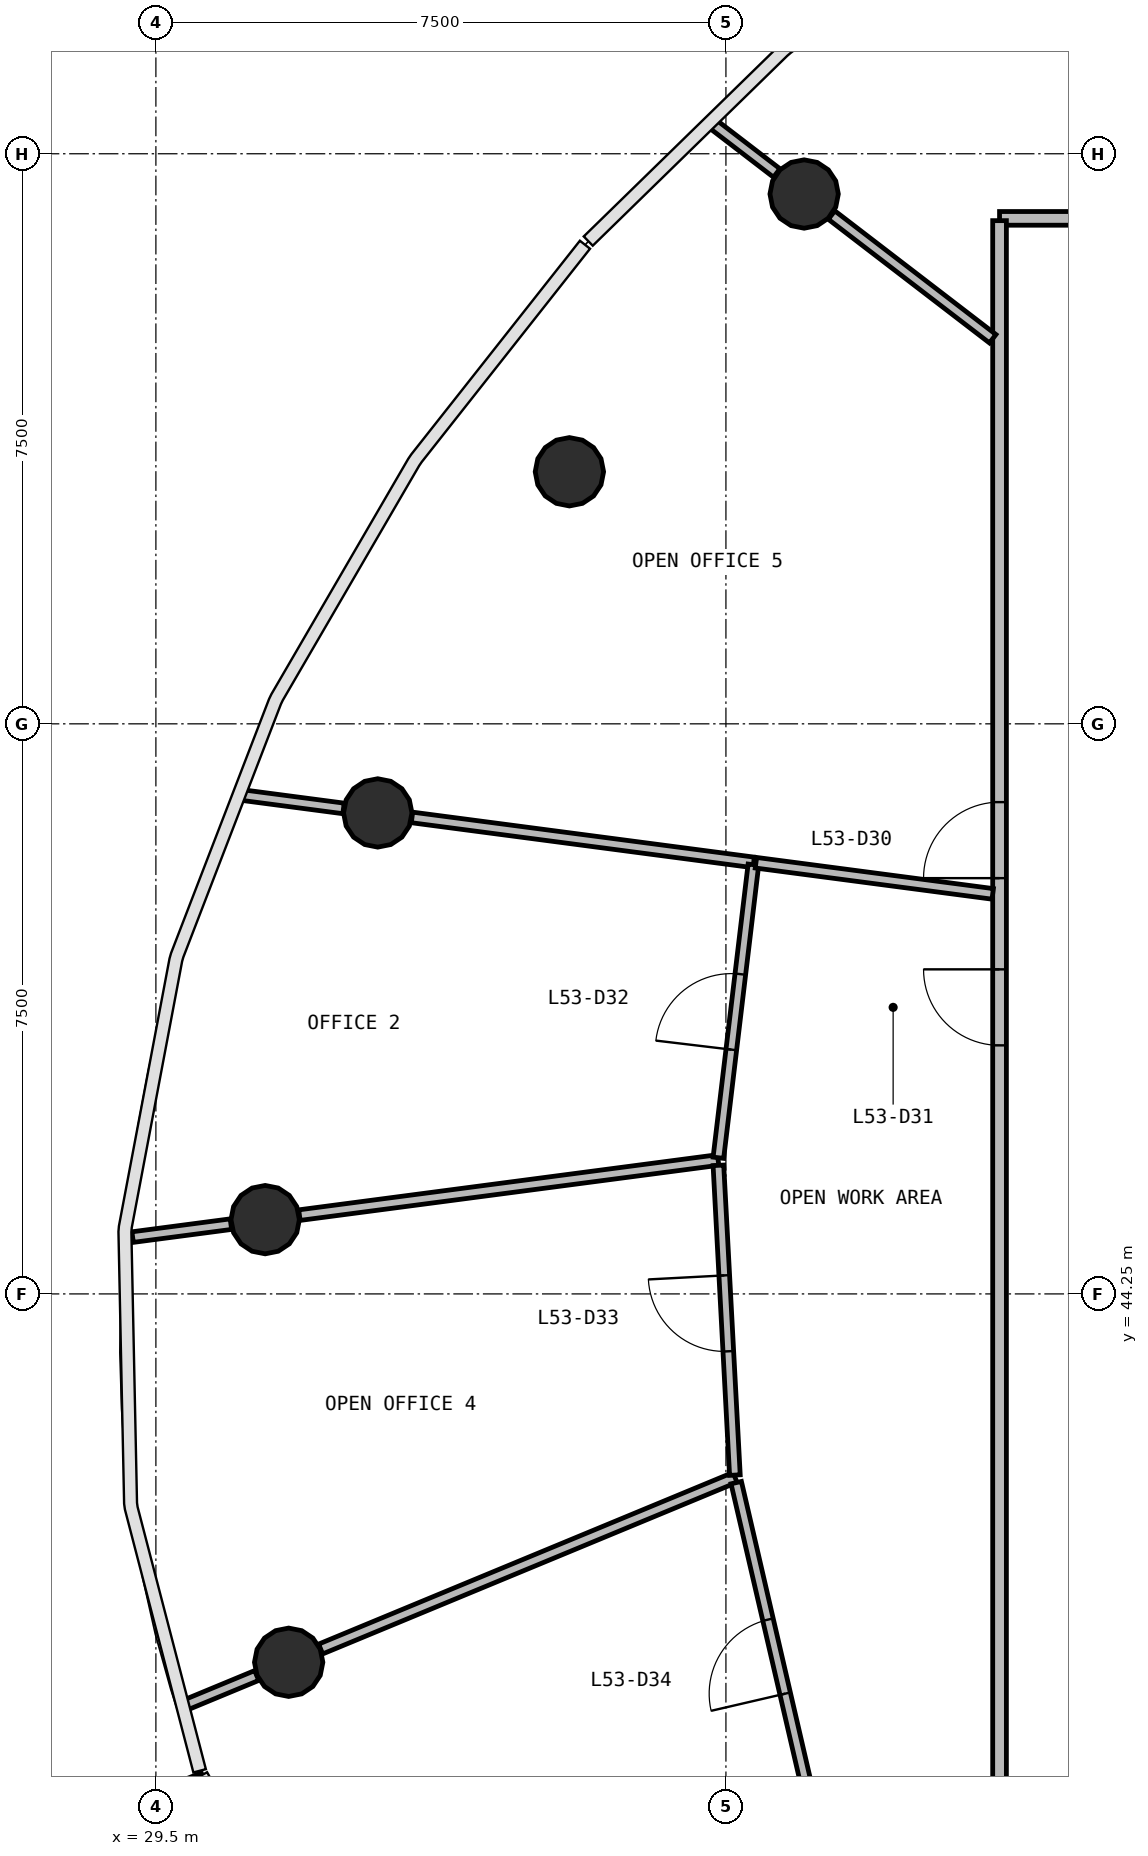
"""IFC4 building model, lengths in metres.
Left out: names, types, materials, properties, quantities, classifications, styles, units other than length and angle.
Written with IfcOpenShell. Run it as: python <this file> out.ifc"""

import sys

from ifc_helpers import new_model, si_unit, direction, frame, frame_2d, origin, origin_2d, place, context, subcontext, project, spatial, rectangle, circle, extrude, source, transform, mapped, element, fill, save


model = new_model("IFC4")
c1 = context("Model", 3, precision=1e-05, world=origin(), true_north=direction((0.0, 1.0)))
c2 = subcontext(c1, "Body", "Model", "MODEL_VIEW")
j1 = project(units=[si_unit("LENGTHUNIT", "METRE"), si_unit("PLANEANGLEUNIT", "RADIAN")], contexts=[c1])
p1 = place(None, origin())
s1 = spatial("IfcSite", under=j1, at=p1, CompositionType="ELEMENT")
p2 = place(p1, origin())
s2 = spatial("IfcBuilding", under=s1, at=p2, CompositionType="ELEMENT")
p3 = place(p2, frame((0.0, 0.0, 218.9)))
s3 = spatial("IfcBuildingStorey", under=s2, at=p3, CompositionType="ELEMENT", Elevation=218.9)
m1 = source(origin(), c2, "Body", "SweptSolid", [
    extrude(circle(Radius=0.45, at=origin_2d()), origin(), (0.0, 0.0, 1.0), 3.9),
])
for number, where, z_axis, x_axis in (
    (1, (38.029, 58.72, 0.0), (0.0, 0.0, 1.0), (1.0, 0.0, 0.0)),
    (2, (34.941, 55.066, 0.0), (0.0, 0.0, 1.0), (1.0, 0.0, 0.0)),
    (3, (32.419, 50.578, 0.0), (0.0, 0.0, 1.0), (1.0, 0.0, 0.0)),
    (4, (30.938, 45.227, 0.0), (0.0, 0.0, 1.0), (1.0, 0.0, 0.0)),
    (5, (31.247, 39.404, 0.0), (0.0, 0.0, 1.0), (1.0, 0.0, 0.0)),
):
    element("IfcColumn", number, at=place(p3, frame(where, z_axis=z_axis, x_axis=x_axis)), inside=s3, PredefinedType="COLUMN", context=c2, shape_type="MappedRepresentation", body=[
        mapped(m1, transform((0.0, 0.0, 0.0), scale=1.0)),
    ])
p4 = place(p3, frame((40.6, 58.4, 0.0), z_axis=(0.0, 0.0, 1.0), x_axis=(1.0, 0.0, 0.0)))
e6 = element("IfcWall", 6, at=p4, inside=s3, PredefinedType="PARTITIONING", context=c2, shape_type="SweptSolid", body=[
    extrude(rectangle(XDim=22.8, YDim=0.18, at=frame_2d((11.4, 0.0))), origin(), (0.0, 0.0, 1.0), 2.88),
])
p5 = place(p4, frame((10.95, 0.0, 0.0)))
e7 = element("IfcOpeningElement", 7, at=p5, cuts=e6, PredefinedType="OPENING", context=c2, shape_type="SweptSolid", body=[
    extrude(rectangle(XDim=1.0, YDim=2.1, at=frame_2d((0.5, 1.05))), frame((0.0, 0.1, 0.0), z_axis=(0.0, -1.0, 0.0), x_axis=(1.0, 0.0, 0.0)), (0.0, 0.0, 1.0), 0.2),
])
p6 = place(p4, frame((8.75, 0.0, 0.0)))
e8 = element("IfcOpeningElement", 8, at=p6, cuts=e6, PredefinedType="OPENING", context=c2, shape_type="SweptSolid", body=[
    extrude(rectangle(XDim=1.0, YDim=2.1, at=frame_2d((0.5, 1.05))), frame((0.0, 0.1, 0.0), z_axis=(0.0, -1.0, 0.0), x_axis=(1.0, 0.0, 0.0)), (0.0, 0.0, 1.0), 0.2),
])
p7 = place(p3, frame((40.6, 37.63, 0.0), z_axis=(0.0, 0.0, 1.0), x_axis=(0.0, 1.0, 0.0)))
e9 = element("IfcWall", 9, at=p7, inside=s3, PredefinedType="PARTITIONING", context=c2, shape_type="SweptSolid", body=[
    extrude(rectangle(XDim=20.74, YDim=0.18, at=frame_2d((10.37, 0.0))), origin(), (0.0, 0.0, 1.0), 2.88),
])
p8 = place(p7, frame((12.09, 0.0, 0.0)))
e10 = element("IfcOpeningElement", 10, at=p8, cuts=e9, PredefinedType="OPENING", context=c2, shape_type="SweptSolid", body=[
    extrude(rectangle(XDim=1.0, YDim=2.1, at=frame_2d((0.5, 1.05))), frame((0.0, 0.1, 0.0), z_axis=(0.0, -1.0, 0.0), x_axis=(1.0, 0.0, 0.0)), (0.0, 0.0, 1.0), 0.2),
])
p9 = place(p7, frame((9.89, 0.0, 0.0)))
e11 = element("IfcOpeningElement", 11, at=p9, cuts=e9, PredefinedType="OPENING", context=c2, shape_type="SweptSolid", body=[
    extrude(rectangle(XDim=1.0, YDim=2.1, at=frame_2d((0.5, 1.05))), frame((0.0, 0.1, 0.0), z_axis=(0.0, -1.0, 0.0), x_axis=(1.0, 0.0, 0.0)), (0.0, 0.0, 1.0), 0.2),
])
p10 = place(p3, frame((37.12, 41.836, 0.0), z_axis=(0.0, 0.0, 1.0), x_axis=(-0.923888768436, -0.382661134108, 0.0)))
e12 = element("IfcWall", 12, at=p10, inside=s3, PredefinedType="PARTITIONING", context=c2, shape_type="SweptSolid", body=[
    extrude(rectangle(XDim=5.902, YDim=0.14, at=frame_2d((2.951, 0.0))), origin(), (0.0, 0.0, 1.0), 2.88),
])
p11 = place(p3, frame((36.897, 46.012, 0.0), z_axis=(0.0, 0.0, 1.0), x_axis=(-0.991443375062, -0.130537481379, 0.0)))
e13 = element("IfcWall", 13, at=p11, inside=s3, PredefinedType="PARTITIONING", context=c2, shape_type="SweptSolid", body=[
    extrude(rectangle(XDim=5.557, YDim=0.14, at=frame_2d((2.778, 0.0))), origin(), (0.0, 0.0, 1.0), 2.88),
])
p12 = place(p3, frame((38.154, 37.375, 0.0), z_axis=(0.0, 0.0, 1.0), x_axis=(-0.225883778656, 0.974154258082, 0.0)))
e14 = element("IfcWall", 14, at=p12, inside=s3, PredefinedType="PARTITIONING", context=c2, shape_type="SweptSolid", body=[
    extrude(rectangle(XDim=4.508, YDim=0.14, at=frame_2d((2.254, 0.0))), origin(), (0.0, 0.0, 1.0), 2.88),
])
p13 = place(p12, frame((1.658, 0.0, 0.0)))
e15 = element("IfcOpeningElement", 15, at=p13, cuts=e14, PredefinedType="OPENING", context=c2, shape_type="SweptSolid", body=[
    extrude(rectangle(XDim=1.0, YDim=2.1, at=frame_2d((0.5, 1.05))), frame((0.0, 0.08, 0.0), z_axis=(0.0, -1.0, 0.0), x_axis=(1.0, 0.0, 0.0)), (0.0, 0.0, 1.0), 0.16),
])
p14 = place(p3, frame((37.365, 49.927, 0.0), z_axis=(0.0, 0.0, 1.0), x_axis=(-0.991445679667, 0.130519976512, 0.0)))
e16 = element("IfcWall", 16, at=p14, inside=s3, PredefinedType="PARTITIONING", context=c2, shape_type="SweptSolid", body=[
    extrude(rectangle(XDim=4.534, YDim=0.14, at=frame_2d((2.267, 0.0))), origin(), (0.0, 0.0, 1.0), 2.88),
])
p15 = place(p3, frame((37.118, 41.866, 0.0), z_axis=(0.0, 0.0, 1.0), x_axis=(-0.053180494254, 0.998584916285, 0.0)))
e17 = element("IfcWall", 17, at=p15, inside=s3, PredefinedType="PARTITIONING", context=c2, shape_type="SweptSolid", body=[
    extrude(rectangle(XDim=4.081, YDim=0.14, at=frame_2d((2.041, 0.0))), origin(), (0.0, 0.0, 1.0), 2.88),
])
p16 = place(p15, frame((1.631, 0.0, 0.0)))
e18 = element("IfcOpeningElement", 18, at=p16, cuts=e17, PredefinedType="OPENING", context=c2, shape_type="SweptSolid", body=[
    extrude(rectangle(XDim=1.0, YDim=2.1, at=frame_2d((0.5, 1.05))), frame((0.0, 0.08, 0.0), z_axis=(0.0, -1.0, 0.0), x_axis=(1.0, 0.0, 0.0)), (0.0, 0.0, 1.0), 0.16),
])
p17 = place(p3, frame((36.901, 46.042, 0.0), z_axis=(0.0, 0.0, 1.0), x_axis=(0.118646859406, 0.992936514966, 0.0)))
e19 = element("IfcWall", 19, at=p17, inside=s3, PredefinedType="PARTITIONING", context=c2, shape_type="SweptSolid", body=[
    extrude(rectangle(XDim=3.883, YDim=0.14, at=frame_2d((1.941, 0.0))), origin(), (0.0, 0.0, 1.0), 2.88),
])
p18 = place(p17, frame((1.433, 0.0, 0.0)))
e20 = element("IfcOpeningElement", 20, at=p18, cuts=e19, PredefinedType="OPENING", context=c2, shape_type="SweptSolid", body=[
    extrude(rectangle(XDim=1.0, YDim=2.1, at=frame_2d((0.5, 1.05))), frame((0.0, 0.08, 0.0), z_axis=(0.0, -1.0, 0.0), x_axis=(1.0, 0.0, 0.0)), (0.0, 0.0, 1.0), 0.16),
])
p19 = place(p3, frame((40.51, 49.513, 0.0), z_axis=(0.0, 0.0, 1.0), x_axis=(-0.991443713746, 0.13053490902, 0.0)))
e21 = element("IfcWall", 21, at=p19, inside=s3, PredefinedType="PARTITIONING", context=c2, shape_type="SweptSolid", body=[
    extrude(rectangle(XDim=3.142, YDim=0.14, at=frame_2d((1.571, 0.0))), origin(), (0.0, 0.0, 1.0), 2.88),
])
p20 = place(p3, frame((40.51, 56.817, 0.0), z_axis=(0.0, 0.0, 1.0), x_axis=(-0.793363703091, 0.608747923707, 0.0)))
e22 = element("IfcWall", 22, at=p20, inside=s3, PredefinedType="PARTITIONING", context=c2, shape_type="SweptSolid", body=[
    extrude(rectangle(XDim=2.673, YDim=0.14, at=frame_2d((1.336, 0.0))), origin(), (0.0, 0.0, 1.0), 2.88),
])
p21 = place(p3, frame((31.969, 50.637, 0.0), z_axis=(0.0, 0.0, 1.0), x_axis=(-0.991446880033, 0.130510858064, 0.0)))
e23 = element("IfcWall", 23, at=p21, inside=s3, PredefinedType="PARTITIONING", context=c2, shape_type="SweptSolid", body=[
    extrude(rectangle(XDim=1.345, YDim=0.14, at=frame_2d((0.672, 0.0))), origin(), (0.0, 0.0, 1.0), 2.88),
])
p22 = place(p3, frame((30.487, 45.168, 0.0), z_axis=(0.0, 0.0, 1.0), x_axis=(-0.991453658456, -0.130459354341, 0.0)))
e24 = element("IfcWall", 24, at=p22, inside=s3, PredefinedType="PARTITIONING", context=c2, shape_type="SweptSolid", body=[
    extrude(rectangle(XDim=1.304, YDim=0.14, at=frame_2d((0.652, 0.0))), origin(), (0.0, 0.0, 1.0), 2.88),
])
p23 = place(p3, frame((37.668, 58.997, 0.0), z_axis=(0.0, 0.0, 1.0), x_axis=(-0.793388088797, 0.608716141198, 0.0)))
e25 = element("IfcWall", 25, at=p23, inside=s3, PredefinedType="PARTITIONING", context=c2, shape_type="SweptSolid", body=[
    extrude(rectangle(XDim=1.044, YDim=0.14, at=frame_2d((0.522, 0.0))), origin(), (0.0, 0.0, 1.0), 2.88),
])
p24 = place(p3, frame((30.826, 39.23, 0.0), z_axis=(0.0, 0.0, 1.0), x_axis=(-0.92379344364, -0.382891203199, 0.0)))
e26 = element("IfcWall", 26, at=p24, inside=s3, PredefinedType="PARTITIONING", context=c2, shape_type="SweptSolid", body=[
    extrude(rectangle(XDim=1.026, YDim=0.14, at=frame_2d((0.513, 0.0))), origin(), (0.0, 0.0, 1.0), 2.88),
])
m2 = source(origin(), c2, "Body", "SweptSolid", [
    extrude(rectangle(XDim=1.0, YDim=2.1, at=frame_2d((0.5, 1.05))), frame((0.0, 0.025, 0.0), z_axis=(0.0, -1.0, 0.0), x_axis=(1.0, 0.0, 0.0)), (0.0, 0.0, 1.0), 0.05),
])
p25 = place(p8, origin())
e27 = element("IfcDoor", 27, at=p25, inside=s3, OperationType="SINGLE_SWING_LEFT", PredefinedType="DOOR", context=c2, shape_type="MappedRepresentation", body=[
    mapped(m2, transform((0.0, 0.0, 0.0), scale=1.0)),
])
fill(e10, e27)
p26 = place(p9, origin())
e28 = element("IfcDoor", 28, at=p26, inside=s3, OperationType="SINGLE_SWING_RIGHT", PredefinedType="DOOR", context=c2, shape_type="MappedRepresentation", body=[
    mapped(m2, transform((0.0, 0.0, 0.0), scale=1.0)),
])
fill(e11, e28)
p27 = place(p18, origin())
e29 = element("IfcDoor", 29, at=p27, inside=s3, OperationType="SINGLE_SWING_LEFT", PredefinedType="DOOR", context=c2, shape_type="MappedRepresentation", body=[
    mapped(m2, transform((0.0, 0.0, 0.0), scale=1.0)),
])
fill(e20, e29)
p28 = place(p16, origin())
e30 = element("IfcDoor", 30, at=p28, inside=s3, OperationType="SINGLE_SWING_RIGHT", PredefinedType="DOOR", context=c2, shape_type="MappedRepresentation", body=[
    mapped(m2, transform((0.0, 0.0, 0.0), scale=1.0)),
])
fill(e18, e30)
p29 = place(p13, origin())
e31 = element("IfcDoor", 31, at=p29, inside=s3, OperationType="SINGLE_SWING_LEFT", PredefinedType="DOOR", context=c2, shape_type="MappedRepresentation", body=[
    mapped(m2, transform((0.0, 0.0, 0.0), scale=1.0)),
])
fill(e15, e31)
save(model, sys.argv[1])
